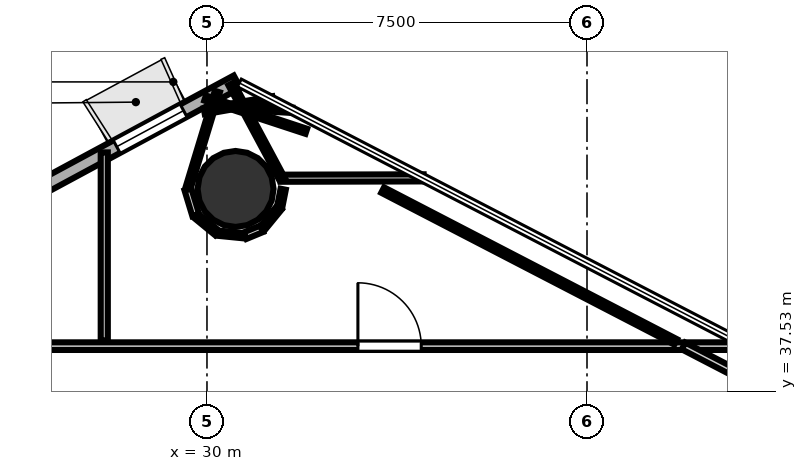
"""IFC4 building model, lengths in metres.
Left out: names, types, materials, properties, quantities, classifications, styles, units other than length and angle.
Written with IfcOpenShell. Run it as: python <this file> out.ifc"""

import sys

from ifc_helpers import new_model, si_unit, direction, frame, frame_2d, origin, origin_2d, place, context, subcontext, project, spatial, rectangle, hollow_circle, extrude, element, fill, save


model = new_model("IFC4")
c1 = context("Model", 3, precision=1e-05, world=origin(), true_north=direction((0.0, 1.0)))
c2 = subcontext(c1, "Body", "Model", "MODEL_VIEW")
j1 = project(units=[si_unit("LENGTHUNIT", "METRE"), si_unit("PLANEANGLEUNIT", "RADIAN")], contexts=[c1])
p1 = place(None, origin())
s1 = spatial("IfcSite", under=j1, at=p1, CompositionType="ELEMENT")
p2 = place(p1, origin())
s2 = spatial("IfcBuilding", under=s1, at=p2, CompositionType="ELEMENT")
p3 = place(p2, frame((0.0, 0.0, 131.1)))
s3 = spatial("IfcBuildingStorey", under=s2, at=p3, CompositionType="ELEMENT", Elevation=131.1)
p4 = place(p3, frame((30.564, 41.521, 0.0), z_axis=(0.0, 0.0, 1.0), x_axis=(1.0, 0.0, 0.0)))
e1 = element("IfcColumn", 1, at=p4, inside=s3, PredefinedType="COLUMN", context=c2, shape_type="SweptSolid", body=[
    extrude(hollow_circle(Radius=0.75, WallThickness=0.036, at=origin_2d()), origin(), (0.0, 0.0, 1.0), 3.7),
])
p5 = place(p3, frame((30.594, 43.637, 0.0), z_axis=(0.0, 0.0, 1.0), x_axis=(-0.880090959545, -0.474805120999, 0.0)))
e2 = element("IfcWall", 2, at=p5, inside=s3, PredefinedType="SOLIDWALL", context=c2, shape_type="SweptSolid", body=[
    extrude(rectangle(XDim=9.7, YDim=0.28, at=frame_2d((4.85, 0.0))), origin(), (0.0, 0.0, 1.0), 3.52),
])
p6 = place(p5, frame((1.2, 0.0, 0.85)))
e3 = element("IfcOpeningElement", 3, at=p6, cuts=e2, PredefinedType="OPENING", context=c2, shape_type="SweptSolid", body=[
    extrude(rectangle(XDim=1.5, YDim=2.1, at=frame_2d((0.75, 1.05))), frame((0.0, 0.15, 0.0), z_axis=(0.0, -1.0, 0.0), x_axis=(1.0, 0.0, 0.0)), (0.0, 0.0, 1.0), 0.3),
])
p7 = place(p5, frame((6.04, 0.0, 0.85)))
e4 = element("IfcOpeningElement", 4, at=p7, cuts=e2, PredefinedType="OPENING", context=c2, shape_type="SweptSolid", body=[
    extrude(rectangle(XDim=1.5, YDim=2.1, at=frame_2d((0.75, 1.05))), frame((0.0, 0.15, 0.0), z_axis=(0.0, -1.0, 0.0), x_axis=(1.0, 0.0, 0.0)), (0.0, 0.0, 1.0), 0.3),
])
p8 = place(p3, frame((26.42, 38.419, 0.0), z_axis=(0.0, 0.0, 1.0), x_axis=(1.0, 0.0, 0.0)))
e5 = element("IfcWall", 5, at=p8, inside=s3, PredefinedType="PARTITIONING", context=c2, shape_type="SweptSolid", body=[
    extrude(rectangle(XDim=14.264, YDim=0.15, at=frame_2d((7.132, 0.0))), origin(), (0.0, 0.0, 1.0), 2.84),
])
p9 = place(p8, frame((6.559, 0.0, 0.0)))
e6 = element("IfcOpeningElement", 6, at=p9, cuts=e5, PredefinedType="OPENING", context=c2, shape_type="SweptSolid", body=[
    extrude(rectangle(XDim=1.25, YDim=2.2, at=frame_2d((0.625, 1.1))), frame((0.0, 0.085, 0.0), z_axis=(0.0, -1.0, 0.0), x_axis=(1.0, 0.0, 0.0)), (0.0, 0.0, 1.0), 0.17),
])
p10 = place(p3, frame((39.405, 38.423, 0.0), z_axis=(0.0, 0.0, 1.0), x_axis=(0.887824590753, -0.460182024915, 0.0)))
e7 = element("IfcWall", 7, at=p10, inside=s3, PredefinedType="PARTITIONING", context=c2, shape_type="SweptSolid", body=[
    extrude(rectangle(XDim=1.846, YDim=0.15, at=frame_2d((0.923, 0.0))), origin(), (0.0, 0.0, 1.0), 2.84),
])
p11 = place(p3, frame((41.529, 37.991, 0.0), z_axis=(0.0, 0.0, 1.0), x_axis=(-0.801813304709, -0.597574618262, 0.0)))
e8 = element("IfcWall", 8, at=p11, inside=s3, PredefinedType="PARTITIONING", context=c2, shape_type="SweptSolid", body=[
    extrude(rectangle(XDim=2.145, YDim=0.15, at=frame_2d((1.072, 0.0))), origin(), (0.0, 0.0, 1.0), 2.84),
])
p12 = place(p3, frame((29.963, 43.315, 0.0), z_axis=(0.0, 0.0, 1.0), x_axis=(0.950010587393, -0.312217686626, 0.0)))
e9 = element("IfcWall", 9, at=p12, inside=s3, PredefinedType="PARTITIONING", context=c2, shape_type="SweptSolid", body=[
    extrude(rectangle(XDim=2.102, YDim=0.105, at=frame_2d((1.051, 0.0))), origin(), (0.0, 0.0, 1.0), 2.84),
])
p13 = place(p3, frame((34.275, 41.74, 0.0), z_axis=(0.0, 0.0, 1.0), x_axis=(-0.9999968479, -0.002510814596, 0.0)))
e10 = element("IfcWall", 10, at=p13, inside=s3, PredefinedType="PARTITIONING", context=c2, shape_type="SweptSolid", body=[
    extrude(rectangle(XDim=2.82, YDim=0.14, at=frame_2d((1.41, 0.0))), origin(), (0.0, 0.0, 1.0), 2.84),
])
p14 = place(p3, frame((31.483, 41.717, 0.0), z_axis=(0.0, 0.0, 1.0), x_axis=(-0.472589987837, 0.88128241977, 0.0)))
e11 = element("IfcWall", 11, at=p14, inside=s3, PredefinedType="PARTITIONING", context=c2, shape_type="SweptSolid", body=[
    extrude(rectangle(XDim=2.132, YDim=0.12, at=frame_2d((1.066, 0.0))), origin(), (0.0, 0.0, 1.0), 2.84),
])
p15 = place(p3, frame((31.682, 43.073, 0.0), z_axis=(0.0, 0.0, 1.0), x_axis=(-0.998224144137, 0.059569774728, 0.0)))
e12 = element("IfcWall", 12, at=p15, inside=s3, PredefinedType="PARTITIONING", context=c2, shape_type="SweptSolid", body=[
    extrude(rectangle(XDim=0.709, YDim=0.105, at=frame_2d((0.354, 0.0))), origin(), (0.0, 0.0, 1.0), 2.84),
])
p16 = place(p3, frame((31.3, 43.292, 0.0), z_axis=(0.0, 0.0, 1.0), x_axis=(-0.984951189759, -0.172832733568, 0.0)))
e13 = element("IfcWall", 13, at=p16, inside=s3, PredefinedType="PARTITIONING", context=c2, shape_type="SweptSolid", body=[
    extrude(rectangle(XDim=1.375, YDim=0.12, at=frame_2d((0.687, 0.0))), origin(), (0.0, 0.0, 1.0), 2.84),
])
p17 = place(p3, frame((30.205, 43.442, 0.0), z_axis=(0.0, 0.0, 1.0), x_axis=(-0.290383728265, -0.956910283339, 0.0)))
e14 = element("IfcWall", 14, at=p17, inside=s3, PredefinedType="PARTITIONING", context=c2, shape_type="SweptSolid", body=[
    extrude(rectangle(XDim=1.999, YDim=0.105, at=frame_2d((0.999, 0.0))), origin(), (0.0, 0.0, 1.0), 2.84),
])
p18 = place(p3, frame((29.624, 41.512, 0.0), z_axis=(0.0, 0.0, 1.0), x_axis=(0.290186937255, -0.956969979386, 0.0)))
e15 = element("IfcWall", 15, at=p18, inside=s3, PredefinedType="PARTITIONING", context=c2, shape_type="SweptSolid", body=[
    extrude(rectangle(XDim=0.528, YDim=0.14, at=frame_2d((0.264, 0.0))), origin(), (0.0, 0.0, 1.0), 2.84),
])
p19 = place(p3, frame((29.788, 40.991, 0.0), z_axis=(0.0, 0.0, 1.0), x_axis=(0.773009460249, -0.634394494275, 0.0)))
e16 = element("IfcWall", 16, at=p19, inside=s3, PredefinedType="PARTITIONING", context=c2, shape_type="SweptSolid", body=[
    extrude(rectangle(XDim=0.528, YDim=0.12, at=frame_2d((0.264, 0.0))), origin(), (0.0, 0.0, 1.0), 2.84),
])
p20 = place(p3, frame((30.213, 40.649, 0.0), z_axis=(0.0, 0.0, 1.0), x_axis=(0.995191506225, -0.09794828195, 0.0)))
e17 = element("IfcWall", 17, at=p20, inside=s3, PredefinedType="PARTITIONING", context=c2, shape_type="SweptSolid", body=[
    extrude(rectangle(XDim=0.528, YDim=0.105, at=frame_2d((0.264, 0.0))), origin(), (0.0, 0.0, 1.0), 2.84),
])
p21 = place(p3, frame((30.753, 40.6, 0.0), z_axis=(0.0, 0.0, 1.0), x_axis=(0.923949766891, 0.382513827544, 0.0)))
e18 = element("IfcWall", 18, at=p21, inside=s3, PredefinedType="PARTITIONING", context=c2, shape_type="SweptSolid", body=[
    extrude(rectangle(XDim=0.355, YDim=0.14, at=frame_2d((0.177, 0.0))), origin(), (0.0, 0.0, 1.0), 2.84),
])
p22 = place(p3, frame((31.094, 40.745, 0.0), z_axis=(0.0, 0.0, 1.0), x_axis=(0.634394494275, 0.773009460249, 0.0)))
e19 = element("IfcWall", 19, at=p22, inside=s3, PredefinedType="PARTITIONING", context=c2, shape_type="SweptSolid", body=[
    extrude(rectangle(XDim=0.528, YDim=0.12, at=frame_2d((0.264, 0.0))), origin(), (0.0, 0.0, 1.0), 2.84),
])
p23 = place(p3, frame((31.435, 41.167, 0.0), z_axis=(0.0, 0.0, 1.0), x_axis=(0.19466594417, 0.980869598968, 0.0)))
e20 = element("IfcWall", 20, at=p23, inside=s3, PredefinedType="PARTITIONING", context=c2, shape_type="SweptSolid", body=[
    extrude(rectangle(XDim=0.356, YDim=0.105, at=frame_2d((0.178, 0.0))), origin(), (0.0, 0.0, 1.0), 2.84),
])
p24 = place(p3, frame((33.467, 41.5, 0.0), z_axis=(0.0, 0.0, 1.0), x_axis=(0.887864555566, -0.460104913003, 0.0)))
e21 = element("IfcWall", 21, at=p24, inside=s3, PredefinedType="PARTITIONING", context=c2, shape_type="SweptSolid", body=[
    extrude(rectangle(XDim=6.514, YDim=0.12, at=frame_2d((3.257, 0.0))), origin(), (0.0, 0.0, 1.0), 2.84),
])
p25 = place(p3, frame((27.973, 38.53, 0.0), z_axis=(0.0, 0.0, 1.0), x_axis=(0.0, 1.0, 0.0)))
e22 = element("IfcWall", 22, at=p25, inside=s3, PredefinedType="PARTITIONING", context=c2, shape_type="SweptSolid", body=[
    extrude(rectangle(XDim=3.713, YDim=0.14, at=frame_2d((1.856, 0.0))), origin(), (0.0, 0.0, 1.0), 2.84),
])
p26 = place(p9, origin())
e23 = element("IfcDoor", 23, at=p26, inside=s3, OperationType="SINGLE_SWING_LEFT", PredefinedType="DOOR", context=c2, shape_type="SweptSolid", body=[
    extrude(rectangle(XDim=1.25, YDim=2.2, at=frame_2d((0.625, 1.1))), frame((0.0, 0.025, 0.0), z_axis=(0.0, -1.0, 0.0), x_axis=(1.0, 0.0, 0.0)), (0.0, 0.0, 1.0), 0.05),
])
fill(e6, e23)
p27 = place(p6, origin())
e24 = element("IfcWindow", 24, at=p27, inside=s3, PartitioningType="SINGLE_PANEL", PredefinedType="WINDOW", context=c2, shape_type="SweptSolid", body=[
    extrude(rectangle(XDim=1.5, YDim=2.1, at=frame_2d((0.75, 1.05))), frame((0.0, 0.03, 0.0), z_axis=(0.0, -1.0, 0.0), x_axis=(1.0, 0.0, 0.0)), (0.0, 0.0, 1.0), 0.06),
])
fill(e3, e24)
save(model, sys.argv[1])
